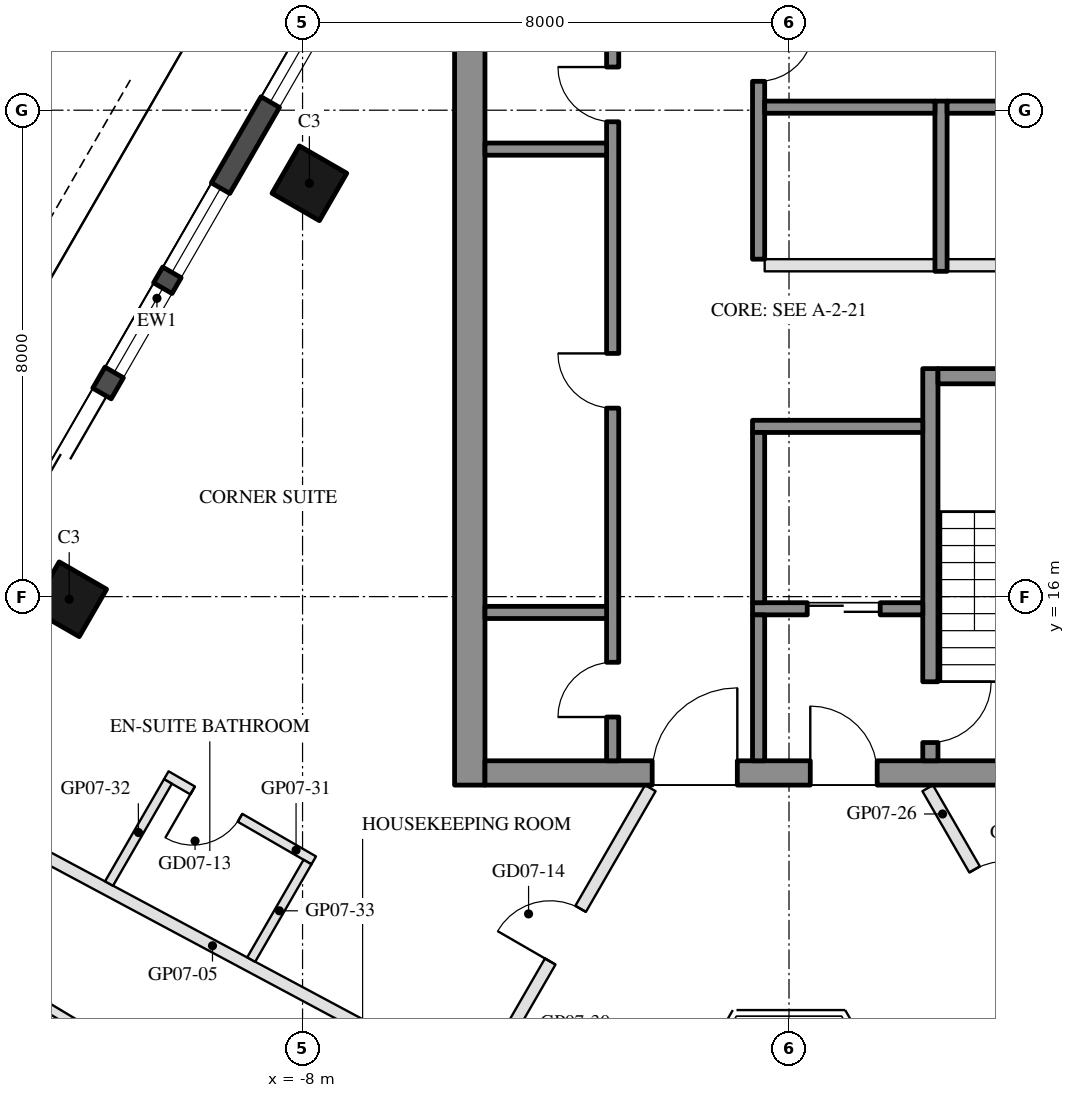
"""IFC4 building model, lengths in metres.
Left out: names, types, materials, properties, quantities, classifications, styles, units other than length and angle.
Written with IfcOpenShell. Run it as: python <this file> out.ifc"""

import sys

from ifc_helpers import new_model, si_unit, direction, frame, frame_2d, origin, origin_2d, place, context, subcontext, project, spatial, rectangle, hollow_rectangle, extrude, element, fill, save


model = new_model("IFC4")
c1 = context("Model", 3, precision=1e-05, world=origin(), true_north=direction((0.0, 1.0)))
c2 = subcontext(c1, "Body", "Model", "MODEL_VIEW")
j1 = project(units=[si_unit("LENGTHUNIT", "METRE"), si_unit("PLANEANGLEUNIT", "RADIAN")], contexts=[c1])
p1 = place(None, origin())
s1 = spatial("IfcSite", under=j1, at=p1, CompositionType="ELEMENT")
p2 = place(p1, origin())
s2 = spatial("IfcBuilding", under=s1, at=p2, CompositionType="ELEMENT")
p3 = place(p2, frame((0.0, 0.0, 98.3)))
s3 = spatial("IfcBuildingStorey", under=s2, at=p3, CompositionType="ELEMENT", Elevation=98.3)
for number, where, z_axis, x_axis in (
    (1, (-7.888, 22.798, 0.0), (0.0, 0.0, 1.0), (0.5, 0.866, 0.0)),
    (2, (-11.838, 15.957, 0.0), (0.0, 0.0, 1.0), (0.5, 0.866, 0.0)),
):
    element("IfcColumn", number, at=place(p3, frame(where, z_axis=z_axis, x_axis=x_axis)), inside=s3, PredefinedType="COLUMN", context=c2, shape_type="SweptSolid", body=[
        extrude(hollow_rectangle(XDim=0.9, YDim=0.9, WallThickness=0.04, at=origin_2d()), origin(), (0.0, 0.0, 1.0), 3.7),
    ])
p4 = place(p3, frame((-7.441, 26.022, 0.0), z_axis=(0.0, 0.0, 1.0), x_axis=(-0.499992533062, -0.86602971478, 0.0)))
e3 = element("IfcWall", 3, at=p4, inside=s3, PredefinedType="SOLIDWALL", context=c2, shape_type="SweptSolid", body=[
    extrude(rectangle(XDim=11.816, YDim=0.35, at=frame_2d((5.908, 0.0))), origin(), (0.0, 0.0, 1.0), 3.55),
])
p5 = place(p4, frame((0.381, 0.0, 0.3)))
e4 = element("IfcOpeningElement", 4, at=p5, cuts=e3, PredefinedType="OPENING", context=c2, shape_type="SweptSolid", body=[
    extrude(rectangle(XDim=1.8, YDim=2.65, at=frame_2d((0.9, 1.325))), frame((0.0, 0.185, 0.0), z_axis=(0.0, -1.0, 0.0), x_axis=(1.0, 0.0, 0.0)), (0.0, 0.0, 1.0), 0.37),
])
p6 = place(p4, frame((7.716, 0.0, 0.0)))
e5 = element("IfcOpeningElement", 5, at=p6, cuts=e3, PredefinedType="OPENING", context=c2, shape_type="SweptSolid", body=[
    extrude(rectangle(XDim=2.4, YDim=2.4, at=frame_2d((1.2, 1.2))), frame((0.0, 0.185, 0.0), z_axis=(0.0, -1.0, 0.0), x_axis=(1.0, 0.0, 0.0)), (0.0, 0.0, 1.0), 0.37),
])
p7 = place(p4, frame((3.815, 0.0, 0.3)))
e6 = element("IfcOpeningElement", 6, at=p7, cuts=e3, PredefinedType="OPENING", context=c2, shape_type="SweptSolid", body=[
    extrude(rectangle(XDim=1.6, YDim=2.65, at=frame_2d((0.8, 1.325))), frame((0.0, 0.185, 0.0), z_axis=(0.0, -1.0, 0.0), x_axis=(1.0, 0.0, 0.0)), (0.0, 0.0, 1.0), 0.37),
])
p8 = place(p4, frame((5.715, 0.0, 0.3)))
e7 = element("IfcOpeningElement", 7, at=p8, cuts=e3, PredefinedType="OPENING", context=c2, shape_type="SweptSolid", body=[
    extrude(rectangle(XDim=1.6, YDim=2.65, at=frame_2d((0.8, 1.325))), frame((0.0, 0.185, 0.0), z_axis=(0.0, -1.0, 0.0), x_axis=(1.0, 0.0, 0.0)), (0.0, 0.0, 1.0), 0.37),
])
p9 = place(p3, frame((-5.25, 12.9, 0.0), z_axis=(0.0, 0.0, 1.0), x_axis=(0.0, 1.0, 0.0)))
e8 = element("IfcWall", 8, at=p9, inside=s3, PredefinedType="SHEAR", context=c2, shape_type="SweptSolid", body=[
    extrude(rectangle(XDim=14.837, YDim=0.5, at=frame_2d((7.418, 0.0))), origin(), (0.0, 0.0, 1.0), 3.5),
])
p10 = place(p3, frame((5.0, 13.1, 0.0), z_axis=(0.0, 0.0, 1.0), x_axis=(-1.0, 0.0, 0.0)))
e9 = element("IfcWall", 9, at=p10, inside=s3, PredefinedType="SHEAR", context=c2, shape_type="SweptSolid", body=[
    extrude(rectangle(XDim=10.0, YDim=0.4, at=frame_2d((5.0, 0.0))), origin(), (0.0, 0.0, 1.0), 3.5),
])
p11 = place(p10, frame((3.55, 0.0, 0.0)))
e10 = element("IfcOpeningElement", 10, at=p11, cuts=e9, PredefinedType="OPENING", context=c2, shape_type="SweptSolid", body=[
    extrude(rectangle(XDim=1.1, YDim=2.1, at=frame_2d((0.55, 1.05))), frame((0.0, 0.21, 0.0), z_axis=(0.0, -1.0, 0.0), x_axis=(1.0, 0.0, 0.0)), (0.0, 0.0, 1.0), 0.42),
])
p12 = place(p10, frame((5.85, 0.0, 0.0)))
e11 = element("IfcOpeningElement", 11, at=p12, cuts=e9, PredefinedType="OPENING", context=c2, shape_type="SweptSolid", body=[
    extrude(rectangle(XDim=1.4, YDim=2.1, at=frame_2d((0.7, 1.05))), frame((0.0, 0.21, 0.0), z_axis=(0.0, -1.0, 0.0), x_axis=(1.0, 0.0, 0.0)), (0.0, 0.0, 1.0), 0.42),
])
p13 = place(p3, frame((2.325, 13.3, 0.0), z_axis=(0.0, 0.0, 1.0), x_axis=(0.0, 1.0, 0.0)))
e12 = element("IfcWall", 12, at=p13, inside=s3, PredefinedType="SHEAR", context=c2, shape_type="SweptSolid", body=[
    extrude(rectangle(XDim=6.45, YDim=0.25, at=frame_2d((3.225, 0.0))), origin(), (0.0, 0.0, 1.0), 3.5),
])
p14 = place(p13, frame((0.3, 0.0, 0.0)))
e13 = element("IfcOpeningElement", 13, at=p14, cuts=e12, PredefinedType="OPENING", context=c2, shape_type="SweptSolid", body=[
    extrude(rectangle(XDim=1.0, YDim=2.1, at=frame_2d((0.5, 1.05))), frame((0.0, 0.135, 0.0), z_axis=(0.0, -1.0, 0.0), x_axis=(1.0, 0.0, 0.0)), (0.0, 0.0, 1.0), 0.27),
])
p15 = place(p3, frame((5.0, 19.625, 0.0), z_axis=(0.0, 0.0, 1.0), x_axis=(-1.0, 0.0, 0.0)))
e14 = element("IfcWall", 14, at=p15, inside=s3, PredefinedType="SHEAR", context=c2, shape_type="SweptSolid", body=[
    extrude(rectangle(XDim=2.55, YDim=0.25, at=frame_2d((1.275, 0.0))), origin(), (0.0, 0.0, 1.0), 3.5),
])
p16 = place(p3, frame((2.2, 18.8, 0.0), z_axis=(0.0, 0.0, 1.0), x_axis=(-1.0, 0.0, 0.0)))
e15 = element("IfcWall", 15, at=p16, inside=s3, PredefinedType="SHEAR", context=c2, shape_type="SweptSolid", body=[
    extrude(rectangle(XDim=2.8, YDim=0.2, at=frame_2d((1.4, 0.0))), origin(), (0.0, 0.0, 1.0), 3.5),
])
p17 = place(p3, frame((2.2, 15.8, 0.0), z_axis=(0.0, 0.0, 1.0), x_axis=(-1.0, 0.0, 0.0)))
e16 = element("IfcWall", 16, at=p17, inside=s3, PredefinedType="SHEAR", context=c2, shape_type="SweptSolid", body=[
    extrude(rectangle(XDim=2.8, YDim=0.2, at=frame_2d((1.4, 0.0))), origin(), (0.0, 0.0, 1.0), 3.5),
])
p18 = place(p17, frame((0.7, 0.0, 0.0)))
e17 = element("IfcOpeningElement", 17, at=p18, cuts=e16, PredefinedType="OPENING", context=c2, shape_type="SweptSolid", body=[
    extrude(rectangle(XDim=1.2, YDim=2.1, at=frame_2d((0.6, 1.05))), frame((0.0, 0.11, 0.0), z_axis=(0.0, -1.0, 0.0), x_axis=(1.0, 0.0, 0.0)), (0.0, 0.0, 1.0), 0.22),
])
p19 = place(p3, frame((-0.5, 15.9, 0.0), z_axis=(0.0, 0.0, 1.0), x_axis=(0.0, 1.0, 0.0)))
e18 = element("IfcWall", 18, at=p19, inside=s3, PredefinedType="SHEAR", context=c2, shape_type="SweptSolid", body=[
    extrude(rectangle(XDim=2.8, YDim=0.2, at=frame_2d((1.4, 0.0))), origin(), (0.0, 0.0, 1.0), 3.5),
])
p20 = place(p3, frame((-0.5, 13.3, 0.0), z_axis=(0.0, 0.0, 1.0), x_axis=(0.0, 1.0, 0.0)))
e19 = element("IfcWall", 19, at=p20, inside=s3, PredefinedType="SHEAR", context=c2, shape_type="SweptSolid", body=[
    extrude(rectangle(XDim=2.4, YDim=0.2, at=frame_2d((1.2, 0.0))), origin(), (0.0, 0.0, 1.0), 3.5),
])
p21 = place(p3, frame((-2.9, 13.3, 0.0), z_axis=(0.0, 0.0, 1.0), x_axis=(0.0, 1.0, 0.0)))
e20 = element("IfcWall", 20, at=p21, inside=s3, PredefinedType="SHEAR", context=c2, shape_type="SweptSolid", body=[
    extrude(rectangle(XDim=12.6, YDim=0.2, at=frame_2d((6.3, 0.0))), origin(), (0.0, 0.0, 1.0), 3.5),
])
p22 = place(p21, frame((0.72, 0.0, 0.0)))
e21 = element("IfcOpeningElement", 21, at=p22, cuts=e20, PredefinedType="OPENING", context=c2, shape_type="SweptSolid", body=[
    extrude(rectangle(XDim=0.9, YDim=2.1, at=frame_2d((0.45, 1.05))), frame((0.0, 0.11, 0.0), z_axis=(0.0, -1.0, 0.0), x_axis=(1.0, 0.0, 0.0)), (0.0, 0.0, 1.0), 0.22),
])
p23 = place(p21, frame((5.8, 0.0, 0.0)))
e22 = element("IfcOpeningElement", 22, at=p23, cuts=e20, PredefinedType="OPENING", context=c2, shape_type="SweptSolid", body=[
    extrude(rectangle(XDim=0.9, YDim=2.1, at=frame_2d((0.45, 1.05))), frame((0.0, 0.11, 0.0), z_axis=(0.0, -1.0, 0.0), x_axis=(1.0, 0.0, 0.0)), (0.0, 0.0, 1.0), 0.22),
])
p24 = place(p21, frame((10.51, 0.0, 0.0)))
e23 = element("IfcOpeningElement", 23, at=p24, cuts=e20, PredefinedType="OPENING", context=c2, shape_type="SweptSolid", body=[
    extrude(rectangle(XDim=0.9, YDim=2.1, at=frame_2d((0.45, 1.05))), frame((0.0, 0.11, 0.0), z_axis=(0.0, -1.0, 0.0), x_axis=(1.0, 0.0, 0.0)), (0.0, 0.0, 1.0), 0.22),
])
p25 = place(p3, frame((-0.5, 21.55, 0.0), z_axis=(0.0, 0.0, 1.0), x_axis=(0.0, 1.0, 0.0)))
e24 = element("IfcWall", 24, at=p25, inside=s3, PredefinedType="SHEAR", context=c2, shape_type="SweptSolid", body=[
    extrude(rectangle(XDim=4.15, YDim=0.2, at=frame_2d((2.075, 0.0))), origin(), (0.0, 0.0, 1.0), 3.5),
])
p26 = place(p25, frame((2.925, 0.0, 0.0)))
e25 = element("IfcOpeningElement", 25, at=p26, cuts=e24, PredefinedType="OPENING", context=c2, shape_type="SweptSolid", body=[
    extrude(rectangle(XDim=0.9, YDim=2.1, at=frame_2d((0.45, 1.05))), frame((0.0, 0.11, 0.0), z_axis=(0.0, -1.0, 0.0), x_axis=(1.0, 0.0, 0.0)), (0.0, 0.0, 1.0), 0.22),
])
for number, where, z_axis, x_axis in (
    (26, (-3.0, 15.74, 0.0), (0.0, 0.0, 1.0), (-1.0, 0.0, 0.0)),
    (27, (-3.0, 23.36, 0.0), (0.0, 0.0, 1.0), (-1.0, 0.0, 0.0)),
):
    element("IfcWall", number, at=place(p3, frame(where, z_axis=z_axis, x_axis=x_axis)), inside=s3, PredefinedType="SHEAR", context=c2, shape_type="SweptSolid", body=[
        extrude(rectangle(XDim=2.0, YDim=0.2, at=frame_2d((1.0, 0.0))), origin(), (0.0, 0.0, 1.0), 3.5),
    ])
p27 = place(p3, frame((2.5, 21.35, 0.0), z_axis=(0.0, 0.0, 1.0), x_axis=(0.0, 1.0, 0.0)))
e28 = element("IfcWall", 28, at=p27, inside=s3, PredefinedType="SHEAR", context=c2, shape_type="SweptSolid", body=[
    extrude(rectangle(XDim=2.8, YDim=0.2, at=frame_2d((1.4, 0.0))), origin(), (0.0, 0.0, 1.0), 3.5),
])
p28 = place(p3, frame((5.0, 24.05, 0.0), z_axis=(0.0, 0.0, 1.0), x_axis=(-1.0, 0.0, 0.0)))
e29 = element("IfcWall", 29, at=p28, inside=s3, PredefinedType="SHEAR", context=c2, shape_type="SweptSolid", body=[
    extrude(rectangle(XDim=2.4, YDim=0.2, at=frame_2d((1.2, 0.0))), origin(), (0.0, 0.0, 1.0), 3.5),
])
p29 = place(p3, frame((2.4, 24.05, 0.0), z_axis=(0.0, 0.0, 1.0), x_axis=(-1.0, 0.0, 0.0)))
e30 = element("IfcWall", 30, at=p29, inside=s3, PredefinedType="SHEAR", context=c2, shape_type="SweptSolid", body=[
    extrude(rectangle(XDim=2.8, YDim=0.2, at=frame_2d((1.4, 0.0))), origin(), (0.0, 0.0, 1.0), 3.5),
])
p30 = place(p3, frame((5.0, 21.45, 0.0), z_axis=(0.0, 0.0, 1.0), x_axis=(-1.0, 0.0, 0.0)))
e31 = element("IfcWall", 31, at=p30, inside=s3, PredefinedType="PARTITIONING", context=c2, shape_type="SweptSolid", body=[
    extrude(rectangle(XDim=2.4, YDim=0.2, at=frame_2d((1.2, 0.0))), origin(), (0.0, 0.0, 1.0), 3.5),
])
p31 = place(p3, frame((2.4, 21.45, 0.0), z_axis=(0.0, 0.0, 1.0), x_axis=(-1.0, 0.0, 0.0)))
e32 = element("IfcWall", 32, at=p31, inside=s3, PredefinedType="PARTITIONING", context=c2, shape_type="SweptSolid", body=[
    extrude(rectangle(XDim=2.8, YDim=0.2, at=frame_2d((1.4, 0.0))), origin(), (0.0, 0.0, 1.0), 3.5),
])
p32 = place(p3, frame((-13.928, 12.636, 0.0), z_axis=(0.0, 0.0, 1.0), x_axis=(0.881791431821, -0.471639555981, 0.0)))
e33 = element("IfcWall", 33, at=p32, inside=s3, PredefinedType="PARTITIONING", context=c2, shape_type="SweptSolid", body=[
    extrude(rectangle(XDim=10.085, YDim=0.2, at=frame_2d((5.042, 0.0))), origin(), (0.0, 0.0, 1.0), 2.95),
])
p33 = place(p3, frame((2.281, 12.85, 0.0), z_axis=(0.0, 0.0, 1.0), x_axis=(0.500011931275, -0.86601851515, 0.0)))
e34 = element("IfcWall", 34, at=p33, inside=s3, PredefinedType="PARTITIONING", context=c2, shape_type="SweptSolid", body=[
    extrude(rectangle(XDim=4.088, YDim=0.2, at=frame_2d((2.044, 0.0))), origin(), (0.0, 0.0, 1.0), 2.95),
])
p34 = place(p33, frame((1.544, 0.0, 0.0)))
e35 = element("IfcOpeningElement", 35, at=p34, cuts=e34, PredefinedType="OPENING", context=c2, shape_type="SweptSolid", body=[
    extrude(rectangle(XDim=1.0, YDim=2.1, at=frame_2d((0.5, 1.05))), frame((0.0, 0.11, 0.0), z_axis=(0.0, -1.0, 0.0), x_axis=(1.0, 0.0, 0.0)), (0.0, 0.0, 1.0), 0.22),
])
p35 = place(p3, frame((-5.073, 8.013, 0.0), z_axis=(0.0, 0.0, 1.0), x_axis=(0.500003731568, 0.866023249352, 0.0)))
e36 = element("IfcWall", 36, at=p35, inside=s3, PredefinedType="PARTITIONING", context=c2, shape_type="SweptSolid", body=[
    extrude(rectangle(XDim=5.585, YDim=0.2, at=frame_2d((2.792, 0.0))), origin(), (0.0, 0.0, 1.0), 2.95),
])
p36 = place(p35, frame((2.292, 0.0, 0.0)))
e37 = element("IfcOpeningElement", 37, at=p36, cuts=e36, PredefinedType="OPENING", context=c2, shape_type="SweptSolid", body=[
    extrude(rectangle(XDim=1.0, YDim=2.1, at=frame_2d((0.5, 1.05))), frame((0.0, 0.11, 0.0), z_axis=(0.0, -1.0, 0.0), x_axis=(1.0, 0.0, 0.0)), (0.0, 0.0, 1.0), 0.22),
])
p37 = place(p3, frame((-7.816, 11.662, 0.0), z_axis=(0.0, 0.0, 1.0), x_axis=(-0.865996816683, 0.500049511043, 0.0)))
e38 = element("IfcWall", 38, at=p37, inside=s3, PredefinedType="PARTITIONING", context=c2, shape_type="SweptSolid", body=[
    extrude(rectangle(XDim=2.8, YDim=0.15, at=frame_2d((1.4, 0.0))), origin(), (0.0, 0.0, 1.0), 3.55),
])
p38 = place(p37, frame((1.4, 0.0, 0.0)))
e39 = element("IfcOpeningElement", 39, at=p38, cuts=e38, PredefinedType="OPENING", context=c2, shape_type="SweptSolid", body=[
    extrude(rectangle(XDim=0.9, YDim=2.1, at=frame_2d((0.45, 1.05))), frame((0.0, 0.085, 0.0), z_axis=(0.0, -1.0, 0.0), x_axis=(1.0, 0.0, 0.0)), (0.0, 0.0, 1.0), 0.17),
])
p39 = place(p3, frame((-10.213, 12.96, 0.0), z_axis=(0.0, 0.0, 1.0), x_axis=(-0.500013181875, -0.866017793092, 0.0)))
e40 = element("IfcWall", 40, at=p39, inside=s3, PredefinedType="PARTITIONING", context=c2, shape_type="SweptSolid", body=[
    extrude(rectangle(XDim=1.938, YDim=0.15, at=frame_2d((0.969, 0.0))), origin(), (0.0, 0.0, 1.0), 3.55),
])
p40 = place(p3, frame((-7.918, 11.635, 0.0), z_axis=(0.0, 0.0, 1.0), x_axis=(-0.499924019097, -0.866069266935, 0.0)))
e41 = element("IfcWall", 41, at=p40, inside=s3, PredefinedType="PARTITIONING", context=c2, shape_type="SweptSolid", body=[
    extrude(rectangle(XDim=1.852, YDim=0.15, at=frame_2d((0.926, 0.0))), origin(), (0.0, 0.0, 1.0), 3.55),
])
p41 = place(p3, frame((-14.937, 10.888, 0.0), z_axis=(0.0, 0.0, 1.0), x_axis=(0.857798338883, -0.513986390685, 0.0)))
e42 = element("IfcWall", 42, at=p41, inside=s3, PredefinedType="PARTITIONING", context=c2, shape_type="SweptSolid", body=[
    extrude(rectangle(XDim=10.081, YDim=0.15, at=frame_2d((5.041, 0.0))), origin(), (0.0, 0.0, 1.0), 2.96),
])
p42 = place(p5, origin())
e43 = element("IfcWindow", 43, at=p42, inside=s3, PartitioningType="SINGLE_PANEL", PredefinedType="WINDOW", context=c2, shape_type="SweptSolid", body=[
    extrude(rectangle(XDim=1.8, YDim=2.65, at=frame_2d((0.9, 1.325))), frame((0.0, 0.03, 0.0), z_axis=(0.0, -1.0, 0.0), x_axis=(1.0, 0.0, 0.0)), (0.0, 0.0, 1.0), 0.06),
])
fill(e4, e43)
p43 = place(p6, frame((2.4, 0.0, 0.0), z_axis=(0.0, 0.0, 1.0), x_axis=(-1.0, 0.0, 0.0)))
e44 = element("IfcDoor", 44, at=p43, inside=s3, OperationType="SLIDING_TO_LEFT", PredefinedType="DOOR", context=c2, shape_type="SweptSolid", body=[
    extrude(rectangle(XDim=2.4, YDim=2.4, at=frame_2d((1.2, 1.2))), frame((0.0, 0.025, 0.0), z_axis=(0.0, -1.0, 0.0), x_axis=(1.0, 0.0, 0.0)), (0.0, 0.0, 1.0), 0.05),
])
fill(e5, e44)
p44 = place(p7, origin())
e45 = element("IfcWindow", 45, at=p44, inside=s3, PartitioningType="SINGLE_PANEL", PredefinedType="WINDOW", context=c2, shape_type="SweptSolid", body=[
    extrude(rectangle(XDim=1.6, YDim=2.65, at=frame_2d((0.8, 1.325))), frame((0.0, 0.03, 0.0), z_axis=(0.0, -1.0, 0.0), x_axis=(1.0, 0.0, 0.0)), (0.0, 0.0, 1.0), 0.06),
])
fill(e6, e45)
p45 = place(p8, origin())
e46 = element("IfcWindow", 46, at=p45, inside=s3, PartitioningType="SINGLE_PANEL", PredefinedType="WINDOW", context=c2, shape_type="SweptSolid", body=[
    extrude(rectangle(XDim=1.6, YDim=2.65, at=frame_2d((0.8, 1.325))), frame((0.0, 0.03, 0.0), z_axis=(0.0, -1.0, 0.0), x_axis=(1.0, 0.0, 0.0)), (0.0, 0.0, 1.0), 0.06),
])
fill(e7, e46)
p46 = place(p18, origin())
e47 = element("IfcDoor", 47, at=p46, inside=s3, OperationType="DOUBLE_DOOR_SLIDING", PredefinedType="DOOR", context=c2, shape_type="SweptSolid", body=[
    extrude(rectangle(XDim=1.2, YDim=2.1, at=frame_2d((0.6, 1.05))), frame((0.0, 0.025, 0.0), z_axis=(0.0, -1.0, 0.0), x_axis=(1.0, 0.0, 0.0)), (0.0, 0.0, 1.0), 0.05),
])
fill(e17, e47)
p47 = place(p22, origin())
e48 = element("IfcDoor", 48, at=p47, inside=s3, OperationType="SINGLE_SWING_LEFT", PredefinedType="DOOR", context=c2, shape_type="SweptSolid", body=[
    extrude(rectangle(XDim=0.9, YDim=2.1, at=frame_2d((0.45, 1.05))), frame((0.0, 0.025, 0.0), z_axis=(0.0, -1.0, 0.0), x_axis=(1.0, 0.0, 0.0)), (0.0, 0.0, 1.0), 0.05),
])
fill(e21, e48)
p48 = place(p23, origin())
e49 = element("IfcDoor", 49, at=p48, inside=s3, OperationType="SINGLE_SWING_RIGHT", PredefinedType="DOOR", context=c2, shape_type="SweptSolid", body=[
    extrude(rectangle(XDim=0.9, YDim=2.1, at=frame_2d((0.45, 1.05))), frame((0.0, 0.025, 0.0), z_axis=(0.0, -1.0, 0.0), x_axis=(1.0, 0.0, 0.0)), (0.0, 0.0, 1.0), 0.05),
])
fill(e22, e49)
p49 = place(p24, origin())
e50 = element("IfcDoor", 50, at=p49, inside=s3, OperationType="SINGLE_SWING_RIGHT", PredefinedType="DOOR", context=c2, shape_type="SweptSolid", body=[
    extrude(rectangle(XDim=0.9, YDim=2.1, at=frame_2d((0.45, 1.05))), frame((0.0, 0.025, 0.0), z_axis=(0.0, -1.0, 0.0), x_axis=(1.0, 0.0, 0.0)), (0.0, 0.0, 1.0), 0.05),
])
fill(e23, e50)
p50 = place(p26, frame((0.9, 0.0, 0.0), z_axis=(0.0, 0.0, 1.0), x_axis=(-1.0, 0.0, 0.0)))
e51 = element("IfcDoor", 51, at=p50, inside=s3, OperationType="SINGLE_SWING_LEFT", PredefinedType="DOOR", context=c2, shape_type="SweptSolid", body=[
    extrude(rectangle(XDim=0.9, YDim=2.1, at=frame_2d((0.45, 1.05))), frame((0.0, 0.025, 0.0), z_axis=(0.0, -1.0, 0.0), x_axis=(1.0, 0.0, 0.0)), (0.0, 0.0, 1.0), 0.05),
])
fill(e25, e51)
p51 = place(p11, frame((1.1, 0.0, 0.0), z_axis=(0.0, 0.0, 1.0), x_axis=(-1.0, 0.0, 0.0)))
e52 = element("IfcDoor", 52, at=p51, inside=s3, OperationType="SINGLE_SWING_LEFT", PredefinedType="DOOR", context=c2, shape_type="SweptSolid", body=[
    extrude(rectangle(XDim=1.1, YDim=2.1, at=frame_2d((0.55, 1.05))), frame((0.0, 0.025, 0.0), z_axis=(0.0, -1.0, 0.0), x_axis=(1.0, 0.0, 0.0)), (0.0, 0.0, 1.0), 0.05),
])
fill(e10, e52)
p52 = place(p12, frame((1.4, 0.0, 0.0), z_axis=(0.0, 0.0, 1.0), x_axis=(-1.0, 0.0, 0.0)))
e53 = element("IfcDoor", 53, at=p52, inside=s3, OperationType="DOUBLE_DOOR_SINGLE_SWING", PredefinedType="DOOR", context=c2, shape_type="SweptSolid", body=[
    extrude(rectangle(XDim=1.4, YDim=2.1, at=frame_2d((0.7, 1.05))), frame((0.0, 0.025, 0.0), z_axis=(0.0, -1.0, 0.0), x_axis=(1.0, 0.0, 0.0)), (0.0, 0.0, 1.0), 0.05),
])
fill(e11, e53)
p53 = place(p14, frame((1.0, 0.0, 0.0), z_axis=(0.0, 0.0, 1.0), x_axis=(-1.0, 0.0, 0.0)))
e54 = element("IfcDoor", 54, at=p53, inside=s3, OperationType="SINGLE_SWING_LEFT", PredefinedType="DOOR", context=c2, shape_type="SweptSolid", body=[
    extrude(rectangle(XDim=1.0, YDim=2.1, at=frame_2d((0.5, 1.05))), frame((0.0, 0.025, 0.0), z_axis=(0.0, -1.0, 0.0), x_axis=(1.0, 0.0, 0.0)), (0.0, 0.0, 1.0), 0.05),
])
fill(e13, e54)
p54 = place(p34, origin())
e55 = element("IfcDoor", 55, at=p54, inside=s3, OperationType="SINGLE_SWING_RIGHT", PredefinedType="DOOR", context=c2, shape_type="SweptSolid", body=[
    extrude(rectangle(XDim=1.0, YDim=2.1, at=frame_2d((0.5, 1.05))), frame((0.0, 0.025, 0.0), z_axis=(0.0, -1.0, 0.0), x_axis=(1.0, 0.0, 0.0)), (0.0, 0.0, 1.0), 0.05),
])
fill(e35, e55)
p55 = place(p38, origin())
e56 = element("IfcDoor", 56, at=p55, inside=s3, OperationType="SINGLE_SWING_RIGHT", PredefinedType="DOOR", context=c2, shape_type="SweptSolid", body=[
    extrude(rectangle(XDim=0.9, YDim=2.1, at=frame_2d((0.45, 1.05))), frame((0.0, 0.025, 0.0), z_axis=(0.0, -1.0, 0.0), x_axis=(1.0, 0.0, 0.0)), (0.0, 0.0, 1.0), 0.05),
])
fill(e39, e56)
p56 = place(p36, origin())
e57 = element("IfcDoor", 57, at=p56, inside=s3, OperationType="SINGLE_SWING_LEFT", PredefinedType="DOOR", context=c2, shape_type="SweptSolid", body=[
    extrude(rectangle(XDim=1.0, YDim=2.1, at=frame_2d((0.5, 1.05))), frame((0.0, 0.025, 0.0), z_axis=(0.0, -1.0, 0.0), x_axis=(1.0, 0.0, 0.0)), (0.0, 0.0, 1.0), 0.05),
])
fill(e37, e57)
save(model, sys.argv[1])
